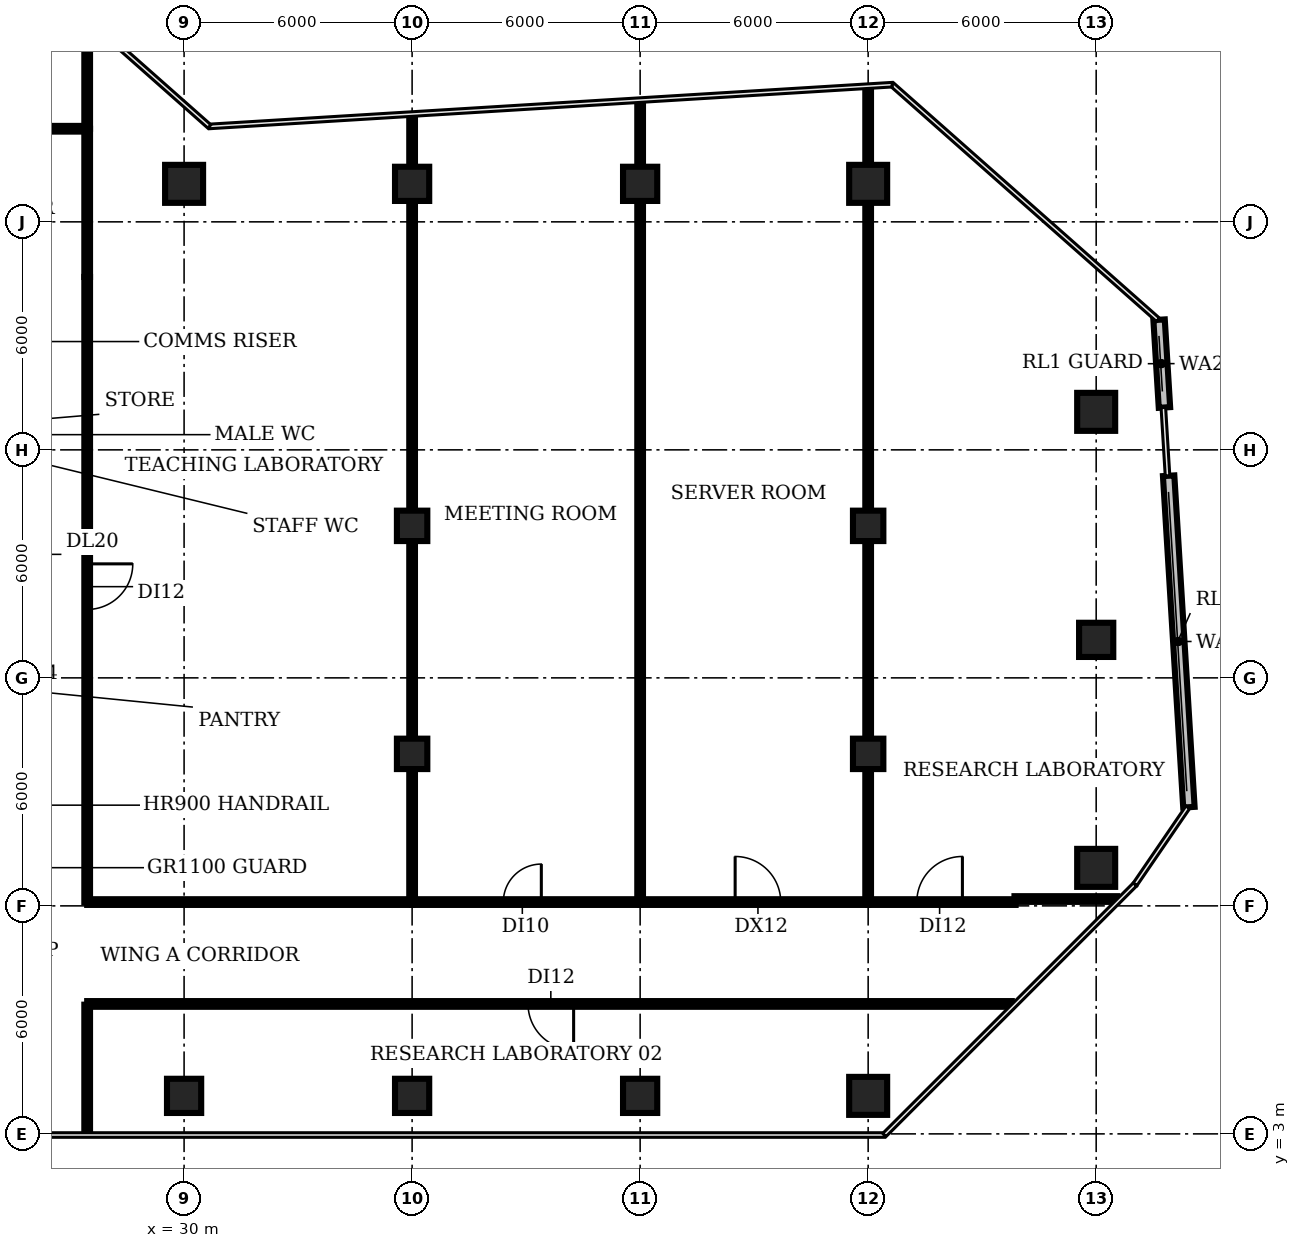
"""IFC4 building model, lengths in metres.
Left out: names, types, materials, properties, quantities, classifications, styles, units other than length and angle.
Written with IfcOpenShell. Run it as: python <this file> out.ifc"""

import sys

from ifc_helpers import new_model, si_unit, direction, frame, frame_2d, origin, origin_2d, place, context, subcontext, project, spatial, rectangle, circle, extrude, element, fill, save


model = new_model("IFC4")
c1 = context("Model", 3, precision=1e-05, world=origin(), true_north=direction((0.0, 1.0)))
c2 = subcontext(c1, "Body", "Model", "MODEL_VIEW")
j1 = project(units=[si_unit("LENGTHUNIT", "METRE"), si_unit("PLANEANGLEUNIT", "RADIAN")], contexts=[c1])
p1 = place(None, origin())
s1 = spatial("IfcSite", under=j1, at=p1, CompositionType="ELEMENT")
p2 = place(p1, origin())
s2 = spatial("IfcBuilding", under=s1, at=p2, CompositionType="ELEMENT")
p3 = place(p2, frame((0.0, 0.0, 96.2)))
s3 = spatial("IfcBuildingStorey", under=s2, at=p3, CompositionType="ELEMENT", Elevation=96.2)
p4 = place(p3, frame((30.0, 4.0, 0.0), z_axis=(0.0, 0.0, 1.0), x_axis=(1.0, 0.0, 0.0)))
e1 = element("IfcColumn", 1, at=p4, inside=s3, PredefinedType="COLUMN", context=c2, shape_type="SweptSolid", body=[
    extrude(rectangle(XDim=0.9, YDim=0.9, at=origin_2d()), origin(), (0.0, 0.0, 1.0), 3.85),
])
p5 = place(p3, frame((30.0, 28.0, 0.0), z_axis=(0.0, 0.0, 1.0), x_axis=(1.0, 0.0, 0.0)))
e2 = element("IfcColumn", 2, at=p5, inside=s3, PredefinedType="COLUMN", context=c2, shape_type="SweptSolid", body=[
    extrude(circle(Radius=0.5, at=origin_2d()), origin(), (0.0, 0.0, 1.0), 3.85),
])
p6 = place(p3, frame((36.0, 4.0, 0.0), z_axis=(0.0, 0.0, 1.0), x_axis=(1.0, 0.0, 0.0)))
e3 = element("IfcColumn", 3, at=p6, inside=s3, PredefinedType="COLUMN", context=c2, shape_type="SweptSolid", body=[
    extrude(rectangle(XDim=0.9, YDim=0.9, at=origin_2d()), origin(), (0.0, 0.0, 1.0), 3.85),
])
for number, where, z_axis, x_axis in (
    (4, (36.0, 13.0, 0.0), (0.0, 0.0, 1.0), (1.0, 0.0, 0.0)),
    (5, (36.0, 19.0, 0.0), (0.0, 0.0, 1.0), (1.0, 0.0, 0.0)),
):
    element("IfcColumn", number, at=place(p3, frame(where, z_axis=z_axis, x_axis=x_axis)), inside=s3, PredefinedType="COLUMN", context=c2, shape_type="SweptSolid", body=[
        extrude(rectangle(XDim=0.8, YDim=0.8, at=origin_2d()), origin(), (0.0, 0.0, 1.0), 3.85),
    ])
for number, where, z_axis, x_axis in (
    (6, (36.0, 28.0, 0.0), (0.0, 0.0, 1.0), (1.0, 0.0, 0.0)),
    (7, (42.0, 4.0, 0.0), (0.0, 0.0, 1.0), (1.0, 0.0, 0.0)),
    (8, (42.0, 28.0, 0.0), (0.0, 0.0, 1.0), (1.0, 0.0, 0.0)),
):
    element("IfcColumn", number, at=place(p3, frame(where, z_axis=z_axis, x_axis=x_axis)), inside=s3, PredefinedType="COLUMN", context=c2, shape_type="SweptSolid", body=[
        extrude(rectangle(XDim=0.9, YDim=0.9, at=origin_2d()), origin(), (0.0, 0.0, 1.0), 3.85),
    ])
p7 = place(p3, frame((48.0, 4.0, 0.0), z_axis=(0.0, 0.0, 1.0), x_axis=(1.0, 0.0, 0.0)))
e9 = element("IfcColumn", 9, at=p7, inside=s3, PredefinedType="COLUMN", context=c2, shape_type="SweptSolid", body=[
    extrude(circle(Radius=0.5, at=origin_2d()), origin(), (0.0, 0.0, 1.0), 3.85),
])
for number, where, z_axis, x_axis in (
    (10, (48.0, 13.0, 0.0), (0.0, 0.0, 1.0), (1.0, 0.0, 0.0)),
    (11, (48.0, 19.0, 0.0), (0.0, 0.0, 1.0), (1.0, 0.0, 0.0)),
):
    element("IfcColumn", number, at=place(p3, frame(where, z_axis=z_axis, x_axis=x_axis)), inside=s3, PredefinedType="COLUMN", context=c2, shape_type="SweptSolid", body=[
        extrude(rectangle(XDim=0.8, YDim=0.8, at=origin_2d()), origin(), (0.0, 0.0, 1.0), 3.85),
    ])
for number, where, z_axis, x_axis in (
    (12, (48.0, 28.0, 0.0), (0.0, 0.0, 1.0), (1.0, 0.0, 0.0)),
    (13, (54.0, 10.0, 0.0), (0.0, 0.0, 1.0), (1.0, 0.0, 0.0)),
):
    element("IfcColumn", number, at=place(p3, frame(where, z_axis=z_axis, x_axis=x_axis)), inside=s3, PredefinedType="COLUMN", context=c2, shape_type="SweptSolid", body=[
        extrude(circle(Radius=0.5, at=origin_2d()), origin(), (0.0, 0.0, 1.0), 3.85),
    ])
p8 = place(p3, frame((54.0, 16.0, 0.0), z_axis=(0.0, 0.0, 1.0), x_axis=(1.0, 0.0, 0.0)))
e14 = element("IfcColumn", 14, at=p8, inside=s3, PredefinedType="COLUMN", context=c2, shape_type="SweptSolid", body=[
    extrude(rectangle(XDim=0.9, YDim=0.9, at=origin_2d()), origin(), (0.0, 0.0, 1.0), 3.85),
])
p9 = place(p3, frame((54.0, 22.0, 0.0), z_axis=(0.0, 0.0, 1.0), x_axis=(1.0, 0.0, 0.0)))
e15 = element("IfcColumn", 15, at=p9, inside=s3, PredefinedType="COLUMN", context=c2, shape_type="SweptSolid", body=[
    extrude(circle(Radius=0.5, at=origin_2d()), origin(), (0.0, 0.0, 1.0), 3.85),
])
p10 = place(p3, frame((56.44, 11.596, 0.0), z_axis=(0.0, 0.0, 1.0), x_axis=(-0.061073708323, 0.998133258714, 0.0)))
e16 = element("IfcWall", 16, at=p10, inside=s3, PredefinedType="SOLIDWALL", context=c2, shape_type="SweptSolid", body=[
    extrude(rectangle(XDim=8.739, YDim=0.3, at=frame_2d((4.369, 0.0))), origin(), (0.0, 0.0, 1.0), 3.85),
])
p11 = place(p3, frame((55.796, 22.115, 0.0), z_axis=(0.0, 0.0, 1.0), x_axis=(-0.061011339697, 0.998137072966, 0.0)))
e17 = element("IfcWall", 17, at=p11, inside=s3, PredefinedType="SOLIDWALL", context=c2, shape_type="SweptSolid", body=[
    extrude(rectangle(XDim=2.313, YDim=0.3, at=frame_2d((1.156, 0.0))), origin(), (0.0, 0.0, 1.0), 3.85),
])
p12 = place(p3, frame((23.85, 29.45, 0.0), z_axis=(0.0, 0.0, 1.0), x_axis=(1.0, 0.0, 0.0)))
e18 = element("IfcWall", 18, at=p12, inside=s3, PredefinedType="PARTITIONING", context=c2, shape_type="SweptSolid", body=[
    extrude(rectangle(XDim=3.6, YDim=0.15, at=frame_2d((1.8, 0.0))), origin(), (0.0, 0.0, 1.0), 2.83),
])
p13 = place(p12, frame((1.3, 0.0, 0.0)))
e19 = element("IfcOpeningElement", 19, at=p13, cuts=e18, PredefinedType="OPENING", context=c2, shape_type="SweptSolid", body=[
    extrude(rectangle(XDim=0.9, YDim=2.1, at=frame_2d((0.45, 1.05))), frame((0.0, 0.085, 0.0), z_axis=(0.0, -1.0, 0.0), x_axis=(1.0, 0.0, 0.0)), (0.0, 0.0, 1.0), 0.17),
])
p14 = place(p3, frame((27.45, 3.02, 0.0), z_axis=(0.0, 0.0, 1.0), x_axis=(0.0, 1.0, 0.0)))
e20 = element("IfcWall", 20, at=p14, inside=s3, PredefinedType="PARTITIONING", context=c2, shape_type="SweptSolid", body=[
    extrude(rectangle(XDim=3.38, YDim=0.15, at=frame_2d((1.69, 0.0))), origin(), (0.0, 0.0, 1.0), 2.83),
])
p15 = place(p3, frame((27.45, 9.1, 0.0), z_axis=(0.0, 0.0, 1.0), x_axis=(1.0, 0.0, 0.0)))
e21 = element("IfcWall", 21, at=p15, inside=s3, PredefinedType="PARTITIONING", context=c2, shape_type="SweptSolid", body=[
    extrude(rectangle(XDim=8.55, YDim=0.15, at=frame_2d((4.275, 0.0))), origin(), (0.0, 0.0, 1.0), 2.83),
])
p16 = place(p3, frame((27.45, 25.55, 0.0), z_axis=(0.0, 0.0, 1.0), x_axis=(0.0, -1.0, 0.0)))
e22 = element("IfcWall", 22, at=p16, inside=s3, PredefinedType="PARTITIONING", context=c2, shape_type="SweptSolid", body=[
    extrude(rectangle(XDim=16.45, YDim=0.15, at=frame_2d((8.225, 0.0))), origin(), (0.0, 0.0, 1.0), 2.83),
])
p17 = place(p16, frame((7.55, 0.0, 0.0)))
e23 = element("IfcOpeningElement", 23, at=p17, cuts=e22, PredefinedType="OPENING", context=c2, shape_type="SweptSolid", body=[
    extrude(rectangle(XDim=1.2, YDim=2.1, at=frame_2d((0.6, 1.05))), frame((0.0, 0.085, 0.0), z_axis=(0.0, -1.0, 0.0), x_axis=(1.0, 0.0, 0.0)), (0.0, 0.0, 1.0), 0.17),
])
p18 = place(p3, frame((27.45, 25.55, 0.0), z_axis=(0.0, 0.0, 1.0), x_axis=(0.0, 1.0, 0.0)))
e24 = element("IfcWall", 24, at=p18, inside=s3, PredefinedType="PARTITIONING", context=c2, shape_type="SweptSolid", body=[
    extrude(rectangle(XDim=3.9, YDim=0.15, at=frame_2d((1.95, 0.0))), origin(), (0.0, 0.0, 1.0), 2.83),
])
p19 = place(p3, frame((27.45, 29.45, 0.0), z_axis=(0.0, 0.0, 1.0), x_axis=(0.0, 1.0, 0.0)))
e25 = element("IfcWall", 25, at=p19, inside=s3, PredefinedType="PARTITIONING", context=c2, shape_type="SweptSolid", body=[
    extrude(rectangle(XDim=2.84, YDim=0.15, at=frame_2d((1.42, 0.0))), origin(), (0.0, 0.0, 1.0), 2.83),
])
p20 = place(p3, frame((36.0, 9.1, 0.0), z_axis=(0.0, 0.0, 1.0), x_axis=(0.0, 1.0, 0.0)))
e26 = element("IfcWall", 26, at=p20, inside=s3, PredefinedType="PARTITIONING", context=c2, shape_type="SweptSolid", body=[
    extrude(rectangle(XDim=20.69, YDim=0.15, at=frame_2d((10.345, 0.0))), origin(), (0.0, 0.0, 1.0), 2.83),
])
p21 = place(p3, frame((36.0, 9.1, 0.0), z_axis=(0.0, 0.0, 1.0), x_axis=(1.0, 0.0, 0.0)))
e27 = element("IfcWall", 27, at=p21, inside=s3, PredefinedType="PARTITIONING", context=c2, shape_type="SweptSolid", body=[
    extrude(rectangle(XDim=6.0, YDim=0.15, at=frame_2d((3.0, 0.0))), origin(), (0.0, 0.0, 1.0), 2.83),
])
p22 = place(p21, frame((2.4, 0.0, 0.0)))
e28 = element("IfcOpeningElement", 28, at=p22, cuts=e27, PredefinedType="OPENING", context=c2, shape_type="SweptSolid", body=[
    extrude(rectangle(XDim=1.0, YDim=2.1, at=frame_2d((0.5, 1.05))), frame((0.0, 0.085, 0.0), z_axis=(0.0, -1.0, 0.0), x_axis=(1.0, 0.0, 0.0)), (0.0, 0.0, 1.0), 0.17),
])
p23 = place(p3, frame((42.0, 9.1, 0.0), z_axis=(0.0, 0.0, 1.0), x_axis=(0.0, 1.0, 0.0)))
e29 = element("IfcWall", 29, at=p23, inside=s3, PredefinedType="PARTITIONING", context=c2, shape_type="SweptSolid", body=[
    extrude(rectangle(XDim=21.05, YDim=0.15, at=frame_2d((10.525, 0.0))), origin(), (0.0, 0.0, 1.0), 2.83),
])
p24 = place(p3, frame((42.0, 9.1, 0.0), z_axis=(0.0, 0.0, 1.0), x_axis=(1.0, 0.0, 0.0)))
e30 = element("IfcWall", 30, at=p24, inside=s3, PredefinedType="PARTITIONING", context=c2, shape_type="SweptSolid", body=[
    extrude(rectangle(XDim=6.0, YDim=0.15, at=frame_2d((3.0, 0.0))), origin(), (0.0, 0.0, 1.0), 2.83),
])
p25 = place(p24, frame((2.5, 0.0, 0.0)))
e31 = element("IfcOpeningElement", 31, at=p25, cuts=e30, PredefinedType="OPENING", context=c2, shape_type="SweptSolid", body=[
    extrude(rectangle(XDim=1.2, YDim=2.1, at=frame_2d((0.6, 1.05))), frame((0.0, 0.085, 0.0), z_axis=(0.0, -1.0, 0.0), x_axis=(1.0, 0.0, 0.0)), (0.0, 0.0, 1.0), 0.17),
])
p26 = place(p3, frame((48.0, 9.1, 0.0), z_axis=(0.0, 0.0, 1.0), x_axis=(0.0, 1.0, 0.0)))
e32 = element("IfcWall", 32, at=p26, inside=s3, PredefinedType="PARTITIONING", context=c2, shape_type="SweptSolid", body=[
    extrude(rectangle(XDim=21.42, YDim=0.15, at=frame_2d((10.71, 0.0))), origin(), (0.0, 0.0, 1.0), 2.83),
])
p27 = place(p3, frame((48.0, 9.1, 0.0), z_axis=(0.0, 0.0, 1.0), x_axis=(1.0, 0.0, 0.0)))
e33 = element("IfcWall", 33, at=p27, inside=s3, PredefinedType="PARTITIONING", context=c2, shape_type="SweptSolid", body=[
    extrude(rectangle(XDim=3.88, YDim=0.15, at=frame_2d((1.94, 0.0))), origin(), (0.0, 0.0, 1.0), 2.83),
])
p28 = place(p27, frame((1.28, 0.0, 0.0)))
e34 = element("IfcOpeningElement", 34, at=p28, cuts=e33, PredefinedType="OPENING", context=c2, shape_type="SweptSolid", body=[
    extrude(rectangle(XDim=1.2, YDim=2.1, at=frame_2d((0.6, 1.05))), frame((0.0, 0.085, 0.0), z_axis=(0.0, -1.0, 0.0), x_axis=(1.0, 0.0, 0.0)), (0.0, 0.0, 1.0), 0.17),
])
p29 = place(p3, frame((51.78, 6.419, 0.0), z_axis=(0.0, 0.0, 1.0), x_axis=(-1.0, 0.0, 0.0)))
e35 = element("IfcWall", 35, at=p29, inside=s3, PredefinedType="PARTITIONING", context=c2, shape_type="SweptSolid", body=[
    extrude(rectangle(XDim=24.33, YDim=0.15, at=frame_2d((12.165, 0.0))), origin(), (0.0, 0.0, 1.0), 2.83),
])
p30 = place(p29, frame((11.53, 0.0, 0.0)))
e36 = element("IfcOpeningElement", 36, at=p30, cuts=e35, PredefinedType="OPENING", context=c2, shape_type="SweptSolid", body=[
    extrude(rectangle(XDim=1.2, YDim=2.1, at=frame_2d((0.6, 1.05))), frame((0.0, 0.085, 0.0), z_axis=(0.0, -1.0, 0.0), x_axis=(1.0, 0.0, 0.0)), (0.0, 0.0, 1.0), 0.17),
])
p31 = place(p3, frame((51.85, 9.18, 0.0), z_axis=(0.0, 0.0, 1.0), x_axis=(1.0, 0.0, 0.0)))
e37 = element("IfcWall", 37, at=p31, inside=s3, PredefinedType="PARTITIONING", context=c2, shape_type="SweptSolid", body=[
    extrude(rectangle(XDim=2.702, YDim=0.15, at=frame_2d((1.351, 0.0))), origin(), (0.0, 0.0, 1.0), 2.83),
])
p32 = place(p17, origin())
e38 = element("IfcDoor", 38, at=p32, inside=s3, OperationType="SINGLE_SWING_LEFT", PredefinedType="DOOR", context=c2, shape_type="SweptSolid", body=[
    extrude(rectangle(XDim=1.2, YDim=2.1, at=frame_2d((0.6, 1.05))), frame((0.0, 0.025, 0.0), z_axis=(0.0, -1.0, 0.0), x_axis=(1.0, 0.0, 0.0)), (0.0, 0.0, 1.0), 0.05),
])
fill(e23, e38)
p33 = place(p22, origin())
e39 = element("IfcDoor", 39, at=p33, inside=s3, OperationType="SINGLE_SWING_RIGHT", PredefinedType="DOOR", context=c2, shape_type="SweptSolid", body=[
    extrude(rectangle(XDim=1.0, YDim=2.1, at=frame_2d((0.5, 1.05))), frame((0.0, 0.025, 0.0), z_axis=(0.0, -1.0, 0.0), x_axis=(1.0, 0.0, 0.0)), (0.0, 0.0, 1.0), 0.05),
])
fill(e28, e39)
p34 = place(p25, origin())
e40 = element("IfcDoor", 40, at=p34, inside=s3, OperationType="SINGLE_SWING_LEFT", PredefinedType="DOOR", context=c2, shape_type="SweptSolid", body=[
    extrude(rectangle(XDim=1.2, YDim=2.1, at=frame_2d((0.6, 1.05))), frame((0.0, 0.025, 0.0), z_axis=(0.0, -1.0, 0.0), x_axis=(1.0, 0.0, 0.0)), (0.0, 0.0, 1.0), 0.05),
])
fill(e31, e40)
p35 = place(p28, origin())
e41 = element("IfcDoor", 41, at=p35, inside=s3, OperationType="SINGLE_SWING_RIGHT", PredefinedType="DOOR", context=c2, shape_type="SweptSolid", body=[
    extrude(rectangle(XDim=1.2, YDim=2.1, at=frame_2d((0.6, 1.05))), frame((0.0, 0.025, 0.0), z_axis=(0.0, -1.0, 0.0), x_axis=(1.0, 0.0, 0.0)), (0.0, 0.0, 1.0), 0.05),
])
fill(e34, e41)
p36 = place(p30, origin())
e42 = element("IfcDoor", 42, at=p36, inside=s3, OperationType="SINGLE_SWING_LEFT", PredefinedType="DOOR", context=c2, shape_type="SweptSolid", body=[
    extrude(rectangle(XDim=1.2, YDim=2.1, at=frame_2d((0.6, 1.05))), frame((0.0, 0.025, 0.0), z_axis=(0.0, -1.0, 0.0), x_axis=(1.0, 0.0, 0.0)), (0.0, 0.0, 1.0), 0.05),
])
fill(e36, e42)
save(model, sys.argv[1])
